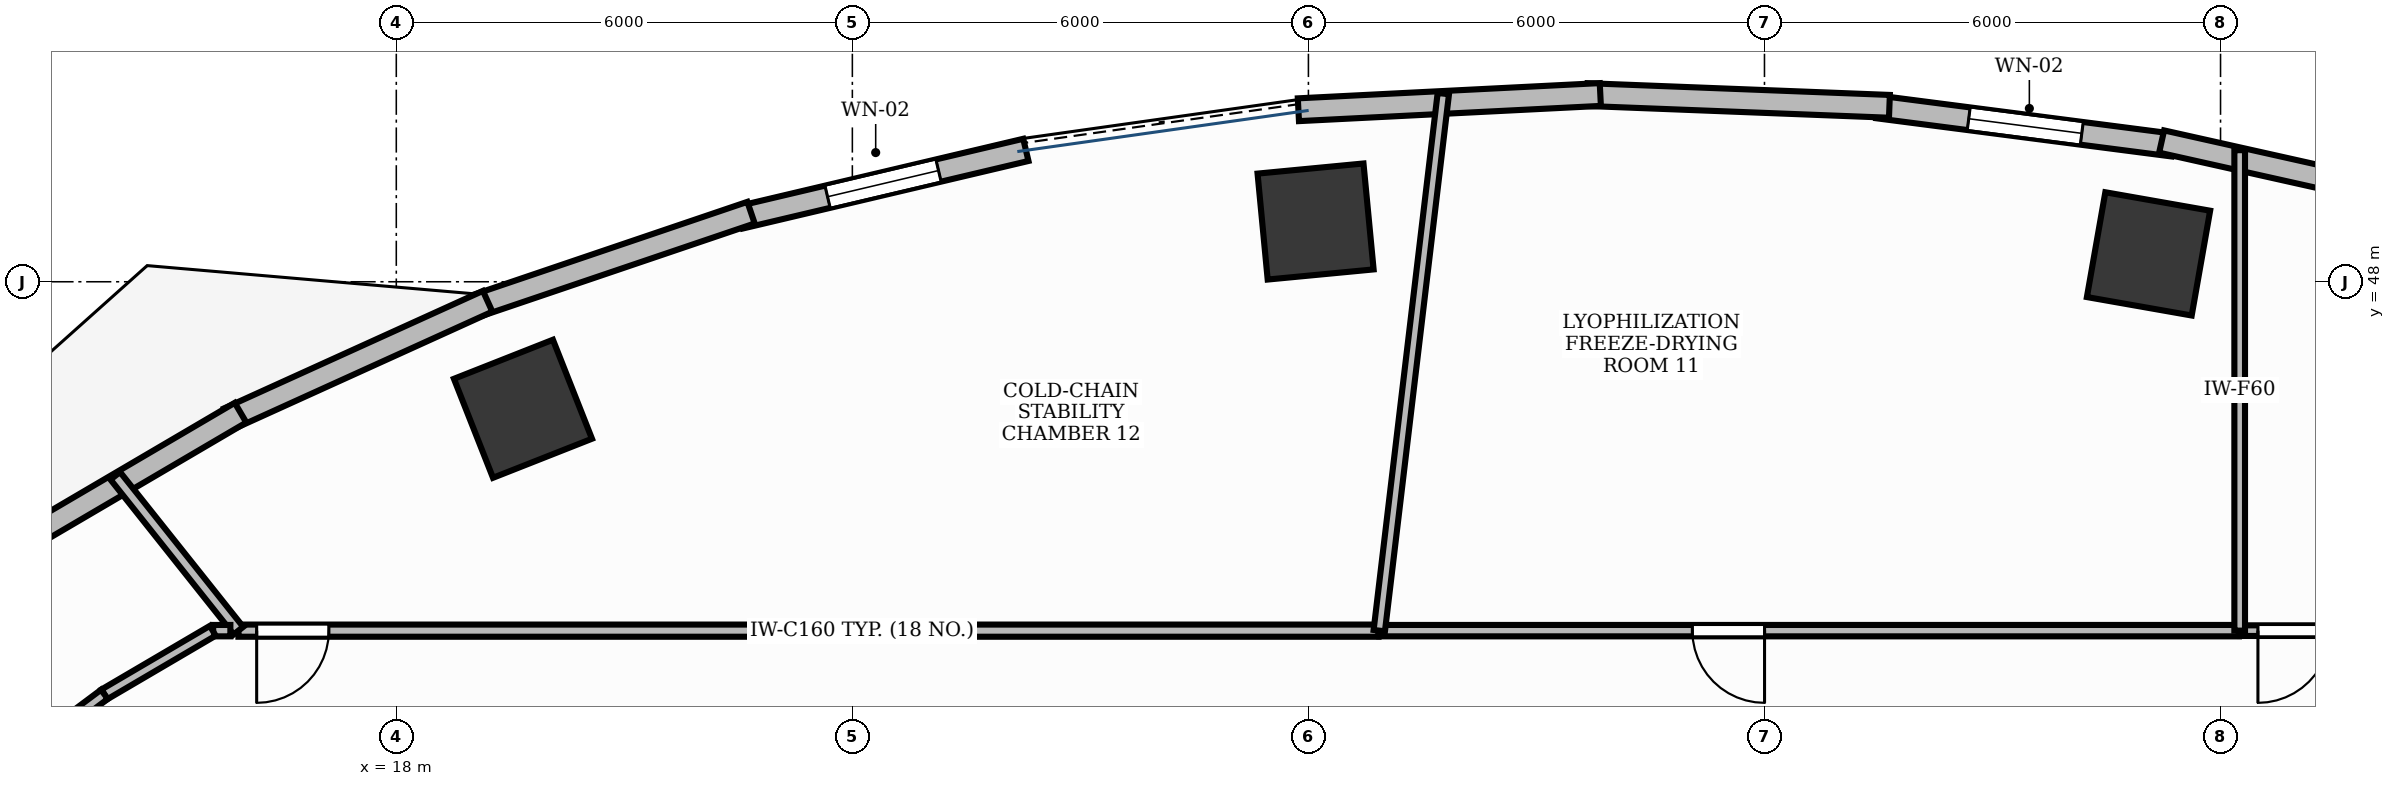
"""IFC4 building model, lengths in metres.
Left out: names, types, materials, properties, quantities, classifications, styles, units other than length and angle.
Written with IfcOpenShell. Run it as: python <this file> out.ifc"""

import sys

from ifc_helpers import new_model, si_unit, direction, frame, frame_2d, origin, origin_2d, place, context, subcontext, project, spatial, rectangle, extrude, element, fill, save


model = new_model("IFC4")
c1 = context("Model", 3, precision=1e-05, world=origin(), true_north=direction((0.0, 1.0)))
c2 = subcontext(c1, "Body", "Model", "MODEL_VIEW")
j1 = project(units=[si_unit("LENGTHUNIT", "METRE"), si_unit("PLANEANGLEUNIT", "RADIAN")], contexts=[c1])
p1 = place(None, origin())
s1 = spatial("IfcSite", under=j1, at=p1, CompositionType="ELEMENT")
p2 = place(p1, origin())
s2 = spatial("IfcBuilding", under=s1, at=p2, CompositionType="ELEMENT")
p3 = place(p2, frame((0.0, 0.0, 72.0)))
s3 = spatial("IfcBuildingStorey", under=s2, at=p3, CompositionType="ELEMENT", Elevation=72.0)
for number, where, z_axis, x_axis in (
    (1, (41.052, 48.367, -0.0), (0.0, 0.0, 1.0), (-0.985, 0.173, 0.0)),
    (2, (30.094, 48.792, -0.0), (0.0, 0.0, 1.0), (0.995, 0.095, 0.0)),
    (3, (19.667, 46.329, -0.0), (0.0, 0.0, 1.0), (0.93, 0.367, 0.0)),
):
    element("IfcColumn", number, at=place(p3, frame(where, z_axis=z_axis, x_axis=x_axis)), inside=s3, PredefinedType="COLUMN", context=c2, shape_type="SweptSolid", body=[
        extrude(rectangle(XDim=1.4, YDim=1.4, at=origin_2d()), origin(), (0.0, 0.0, 1.0), 3.901),
    ])
p4 = place(p3, frame((41.373, 49.798, 0.0), z_axis=(0.0, 0.0, 1.0), x_axis=(-0.991741322416, 0.128254237408, 0.0)))
e4 = element("IfcWall", 4, at=p4, inside=s3, PredefinedType="STANDARD", context=c2, shape_type="SweptSolid", body=[
    extrude(rectangle(XDim=3.916, YDim=0.3, at=frame_2d((1.958, 0.0))), origin(), (0.0, 0.0, 1.0), 3.47),
])
p5 = place(p4, frame((1.208, 0.0, 0.95)))
e5 = element("IfcOpeningElement", 5, at=p5, cuts=e4, PredefinedType="OPENING", context=c2, shape_type="SweptSolid", body=[
    extrude(rectangle(XDim=1.5, YDim=1.8, at=frame_2d((0.75, 0.9))), frame((0.0, 0.165, 0.0), z_axis=(0.0, -1.0, 0.0), x_axis=(1.0, 0.0, 0.0)), (0.0, 0.0, 1.0), 0.33),
])
p6 = place(p3, frame((26.282, 49.735, 0.0), z_axis=(0.0, 0.0, 1.0), x_axis=(-0.973186156802, -0.230018921417, 0.0)))
e6 = element("IfcWall", 6, at=p6, inside=s3, PredefinedType="STANDARD", context=c2, shape_type="SweptSolid", body=[
    extrude(rectangle(XDim=3.861, YDim=0.3, at=frame_2d((1.931, 0.0))), origin(), (0.0, 0.0, 1.0), 3.9),
])
p7 = place(p6, frame((1.181, 0.0, 0.95)))
e7 = element("IfcOpeningElement", 7, at=p7, cuts=e6, PredefinedType="OPENING", context=c2, shape_type="SweptSolid", body=[
    extrude(rectangle(XDim=1.5, YDim=1.8, at=frame_2d((0.75, 0.9))), frame((0.0, 0.165, 0.0), z_axis=(0.0, -1.0, 0.0), x_axis=(1.0, 0.0, 0.0)), (0.0, 0.0, 1.0), 0.33),
])
p8 = place(p3, frame((45.04, 48.991, 0.0), z_axis=(0.0, 0.0, 1.0), x_axis=(-0.975868573345, 0.218358713032, 0.0)))
e8 = element("IfcWall", 8, at=p8, inside=s3, PredefinedType="STANDARD", context=c2, shape_type="SweptSolid", body=[
    extrude(rectangle(XDim=3.909, YDim=0.3, at=frame_2d((1.954, 0.0))), origin(), (0.0, 0.0, 1.0), 3.9),
])
p9 = place(p3, frame((37.644, 50.308, 0.0), z_axis=(0.0, 0.0, 1.0), x_axis=(-0.999245411623, 0.038840794937, 0.0)))
e9 = element("IfcWall", 9, at=p9, inside=s3, PredefinedType="STANDARD", context=c2, shape_type="SweptSolid", body=[
    extrude(rectangle(XDim=3.979, YDim=0.3, at=frame_2d((1.989, 0.0))), origin(), (0.0, 0.0, 1.0), 3.9),
])
p10 = place(p3, frame((33.84, 50.463, 0.0), z_axis=(0.0, 0.0, 1.0), x_axis=(-0.998732359232, -0.050335619826, 0.0)))
e10 = element("IfcWall", 10, at=p10, inside=s3, PredefinedType="STANDARD", context=c2, shape_type="SweptSolid", body=[
    extrude(rectangle(XDim=3.977, YDim=0.3, at=frame_2d((1.989, 0.0))), origin(), (0.0, 0.0, 1.0), 3.47),
])
p11 = place(p3, frame((22.667, 48.909, 0.0), z_axis=(0.0, 0.0, 1.0), x_axis=(-0.94702579403, -0.321157508773, 0.0)))
e11 = element("IfcWall", 11, at=p11, inside=s3, PredefinedType="STANDARD", context=c2, shape_type="SweptSolid", body=[
    extrude(rectangle(XDim=3.83, YDim=0.3, at=frame_2d((1.915, 0.0))), origin(), (0.0, 0.0, 1.0), 3.9),
])
p12 = place(p3, frame((19.201, 47.743, 0.0), z_axis=(0.0, 0.0, 1.0), x_axis=(-0.910623406862, -0.413237233166, 0.0)))
e12 = element("IfcWall", 12, at=p12, inside=s3, PredefinedType="STANDARD", context=c2, shape_type="SweptSolid", body=[
    extrude(rectangle(XDim=3.74, YDim=0.3, at=frame_2d((1.87, 0.0))), origin(), (0.0, 0.0, 1.0), 3.9),
])
p13 = place(p3, frame((15.951, 46.278, 0.0), z_axis=(0.0, 0.0, 1.0), x_axis=(-0.8624654944, -0.506115867139, 0.0)))
e13 = element("IfcWall", 13, at=p13, inside=s3, PredefinedType="STANDARD", context=c2, shape_type="SweptSolid", body=[
    extrude(rectangle(XDim=3.635, YDim=0.3, at=frame_2d((1.818, 0.0))), origin(), (0.0, 0.0, 1.0), 3.9),
])
p14 = place(p3, frame((44.2, 43.41, 0.0), z_axis=(0.0, 0.0, 1.0), x_axis=(-1.0, 0.0, 0.0)))
e14 = element("IfcWall", 14, at=p14, inside=s3, PredefinedType="PARTITIONING", context=c2, shape_type="SweptSolid", body=[
    extrude(rectangle(XDim=1.948, YDim=0.14, at=frame_2d((0.974, 0.0))), origin(), (0.0, 0.0, 1.0), 2.91),
])
p15 = place(p14, frame((0.758, 0.0, 0.0)))
e15 = element("IfcOpeningElement", 15, at=p15, cuts=e14, PredefinedType="OPENING", context=c2, shape_type="SweptSolid", body=[
    extrude(rectangle(XDim=0.95, YDim=2.15, at=frame_2d((0.475, 1.075))), frame((0.0, 0.085, 0.0), z_axis=(0.0, -1.0, 0.0), x_axis=(1.0, 0.0, 0.0)), (0.0, 0.0, 1.0), 0.17),
])
p16 = place(p3, frame((42.242, 43.41, 0.0), z_axis=(0.0, 0.0, 1.0), x_axis=(-1.0, 0.0, 0.0)))
e16 = element("IfcWall", 16, at=p16, inside=s3, PredefinedType="PARTITIONING", context=c2, shape_type="SweptSolid", body=[
    extrude(rectangle(XDim=11.31, YDim=0.15, at=frame_2d((5.655, 0.0))), origin(), (0.0, 0.0, 1.0), 2.91),
])
p17 = place(p16, frame((6.241, 0.0, 0.0)))
e17 = element("IfcOpeningElement", 17, at=p17, cuts=e16, PredefinedType="OPENING", context=c2, shape_type="SweptSolid", body=[
    extrude(rectangle(XDim=0.95, YDim=2.15, at=frame_2d((0.475, 1.075))), frame((0.0, 0.09, 0.0), z_axis=(0.0, -1.0, 0.0), x_axis=(1.0, 0.0, 0.0)), (0.0, 0.0, 1.0), 0.18),
])
p18 = place(p3, frame((30.922, 43.41, 0.0), z_axis=(0.0, 0.0, 1.0), x_axis=(-1.0, 0.0, 0.0)))
e18 = element("IfcWall", 18, at=p18, inside=s3, PredefinedType="PARTITIONING", context=c2, shape_type="SweptSolid", body=[
    extrude(rectangle(XDim=14.999, YDim=0.16, at=frame_2d((7.5, 0.0))), origin(), (0.0, 0.0, 1.0), 2.91),
])
p19 = place(p18, frame((13.809, 0.0, 0.0)))
e19 = element("IfcOpeningElement", 19, at=p19, cuts=e18, PredefinedType="OPENING", context=c2, shape_type="SweptSolid", body=[
    extrude(rectangle(XDim=0.95, YDim=2.15, at=frame_2d((0.475, 1.075))), frame((0.0, 0.095, 0.0), z_axis=(0.0, -1.0, 0.0), x_axis=(1.0, 0.0, 0.0)), (0.0, 0.0, 1.0), 0.19),
])
p20 = place(p3, frame((42.252, 43.41, 0.0), z_axis=(0.0, 0.0, 1.0), x_axis=(0.0, 1.0, 0.0)))
e20 = element("IfcWall", 20, at=p20, inside=s3, PredefinedType="PARTITIONING", context=c2, shape_type="SweptSolid", body=[
    extrude(rectangle(XDim=6.321, YDim=0.14, at=frame_2d((3.161, 0.0))), origin(), (0.0, 0.0, 1.0), 2.91),
])
p21 = place(p3, frame((30.932, 43.41, 0.0), z_axis=(0.0, 0.0, 1.0), x_axis=(0.118403788483, 0.992965529549, 0.0)))
e21 = element("IfcWall", 21, at=p21, inside=s3, PredefinedType="PARTITIONING", context=c2, shape_type="SweptSolid", body=[
    extrude(rectangle(XDim=7.116, YDim=0.15, at=frame_2d((3.558, 0.0))), origin(), (0.0, 0.0, 1.0), 2.91),
])
p22 = place(p3, frame((15.923, 43.41, 0.0), z_axis=(0.0, 0.0, 1.0), x_axis=(-0.622507898818, 0.782613516309, 0.0)))
e22 = element("IfcWall", 22, at=p22, inside=s3, PredefinedType="PARTITIONING", context=c2, shape_type="SweptSolid", body=[
    extrude(rectangle(XDim=2.603, YDim=0.16, at=frame_2d((1.302, 0.0))), origin(), (0.0, 0.0, 1.0), 2.91),
])
p23 = place(p3, frame((15.817, 43.41, 0.0), z_axis=(0.0, 0.0, 1.0), x_axis=(-1.0, 0.0, 0.0)))
e23 = element("IfcWall", 23, at=p23, inside=s3, PredefinedType="PARTITIONING", context=c2, shape_type="SweptSolid", body=[
    extrude(rectangle(XDim=0.226, YDim=0.15, at=frame_2d((0.113, 0.0))), origin(), (0.0, 0.0, 1.0), 2.91),
])
p24 = place(p3, frame((15.586, 43.409, 0.0), z_axis=(0.0, 0.0, 1.0), x_axis=(-0.862446636904, -0.506148000582, 0.0)))
e24 = element("IfcWall", 24, at=p24, inside=s3, PredefinedType="PARTITIONING", context=c2, shape_type="SweptSolid", body=[
    extrude(rectangle(XDim=1.652, YDim=0.15, at=frame_2d((0.826, 0.0))), origin(), (0.0, 0.0, 1.0), 2.91),
])
p25 = place(p3, frame((14.16, 42.572, 0.0), z_axis=(0.0, 0.0, 1.0), x_axis=(-0.800808090092, -0.598921032227, 0.0)))
e25 = element("IfcWall", 25, at=p25, inside=s3, PredefinedType="PARTITIONING", context=c2, shape_type="SweptSolid", body=[
    extrude(rectangle(XDim=3.079, YDim=0.15, at=frame_2d((1.54, 0.0))), origin(), (0.0, 0.0, 1.0), 2.91),
])
p26 = place(p5, origin())
e26 = element("IfcWindow", 26, at=p26, inside=s3, PartitioningType="DOUBLE_PANEL_VERTICAL", PredefinedType="WINDOW", context=c2, shape_type="SweptSolid", body=[
    extrude(rectangle(XDim=1.5, YDim=1.8, at=frame_2d((0.75, 0.9))), frame((0.0, 0.03, 0.0), z_axis=(0.0, -1.0, 0.0), x_axis=(1.0, 0.0, 0.0)), (0.0, 0.0, 1.0), 0.06),
])
fill(e5, e26)
p27 = place(p7, origin())
e27 = element("IfcWindow", 27, at=p27, inside=s3, PartitioningType="DOUBLE_PANEL_VERTICAL", PredefinedType="WINDOW", context=c2, shape_type="SweptSolid", body=[
    extrude(rectangle(XDim=1.5, YDim=1.8, at=frame_2d((0.75, 0.9))), frame((0.0, 0.03, 0.0), z_axis=(0.0, -1.0, 0.0), x_axis=(1.0, 0.0, 0.0)), (0.0, 0.0, 1.0), 0.06),
])
fill(e7, e27)
p28 = place(p15, origin())
e28 = element("IfcDoor", 28, at=p28, inside=s3, OperationType="SINGLE_SWING_RIGHT", PredefinedType="DOOR", context=c2, shape_type="SweptSolid", body=[
    extrude(rectangle(XDim=0.95, YDim=2.15, at=frame_2d((0.475, 1.075))), frame((0.0, 0.025, 0.0), z_axis=(0.0, -1.0, 0.0), x_axis=(1.0, 0.0, 0.0)), (0.0, 0.0, 1.0), 0.05),
])
fill(e15, e28)
p29 = place(p17, origin())
e29 = element("IfcDoor", 29, at=p29, inside=s3, OperationType="SINGLE_SWING_LEFT", PredefinedType="DOOR", context=c2, shape_type="SweptSolid", body=[
    extrude(rectangle(XDim=0.95, YDim=2.15, at=frame_2d((0.475, 1.075))), frame((0.0, 0.025, 0.0), z_axis=(0.0, -1.0, 0.0), x_axis=(1.0, 0.0, 0.0)), (0.0, 0.0, 1.0), 0.05),
])
fill(e17, e29)
p30 = place(p19, origin())
e30 = element("IfcDoor", 30, at=p30, inside=s3, OperationType="SINGLE_SWING_RIGHT", PredefinedType="DOOR", context=c2, shape_type="SweptSolid", body=[
    extrude(rectangle(XDim=0.95, YDim=2.15, at=frame_2d((0.475, 1.075))), frame((0.0, 0.025, 0.0), z_axis=(0.0, -1.0, 0.0), x_axis=(1.0, 0.0, 0.0)), (0.0, 0.0, 1.0), 0.05),
])
fill(e19, e30)
save(model, sys.argv[1])
